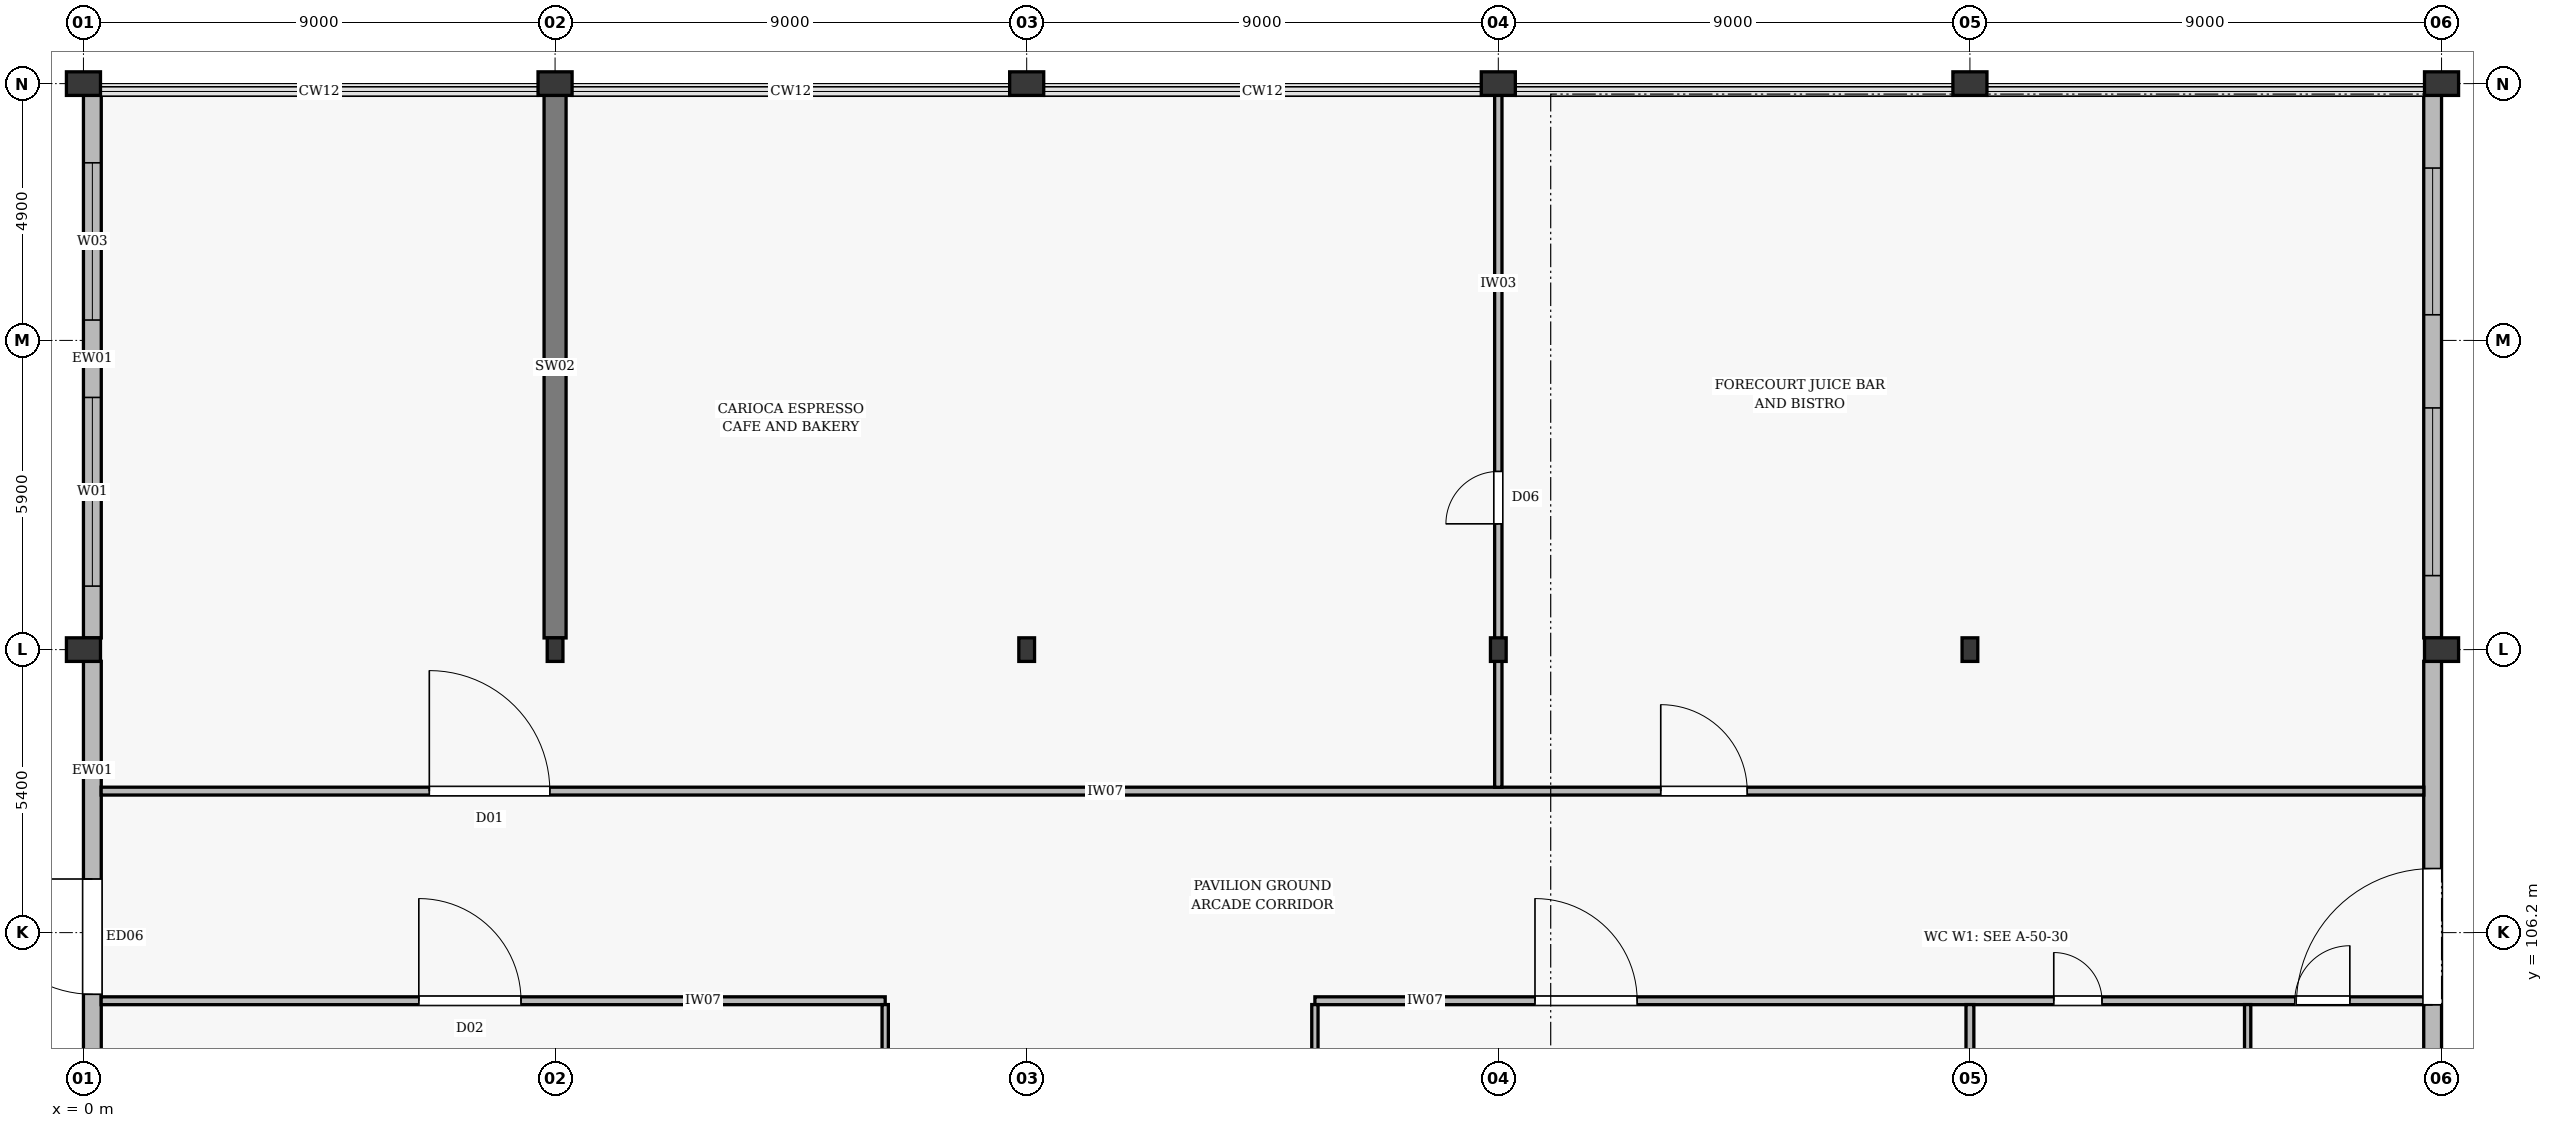
"""IFC4 building model, lengths in metres.
Left out: names, types, materials, properties, quantities, classifications, styles, units other than length and angle.
Written with IfcOpenShell. Run it as: python <this file> out.ifc"""

import sys

from ifc_helpers import new_model, si_unit, direction, frame, frame_2d, origin, origin_2d, place, context, subcontext, project, spatial, rectangle, i_section, extrude, element, fill, save


model = new_model("IFC4")
c1 = context("Model", 3, precision=1e-05, world=origin(), true_north=direction((0.0, 1.0)))
c2 = subcontext(c1, "Body", "Model", "MODEL_VIEW")
j1 = project(units=[si_unit("LENGTHUNIT", "METRE"), si_unit("PLANEANGLEUNIT", "RADIAN")], contexts=[c1])
p1 = place(None, origin())
s1 = spatial("IfcSite", under=j1, at=p1, CompositionType="ELEMENT")
p2 = place(p1, origin())
s2 = spatial("IfcBuilding", under=s1, at=p2, CompositionType="ELEMENT")
p3 = place(p2, origin())
s3 = spatial("IfcBuildingStorey", under=s2, at=p3, CompositionType="ELEMENT", Elevation=0.0)
for number, where, z_axis, x_axis in (
    (1, (0.0, 111.6, 0.0), (0.0, 0.0, 1.0), (1.0, 0.0, 0.0)),
    (2, (0.0, 122.4, 0.0), (0.0, 0.0, 1.0), (1.0, 0.0, 0.0)),
):
    element("IfcColumn", number, at=place(p3, frame(where, z_axis=z_axis, x_axis=x_axis)), inside=s3, PredefinedType="PILASTER", context=c2, shape_type="SweptSolid", body=[
        extrude(rectangle(XDim=0.65, YDim=0.45, at=origin_2d()), origin(), (0.0, 0.0, 1.0), 6.6),
    ])
p4 = place(p3, frame((9.0, 111.6, 0.0), z_axis=(0.0, 0.0, 1.0), x_axis=(1.0, 0.0, 0.0)))
e3 = element("IfcColumn", 3, at=p4, inside=s3, PredefinedType="COLUMN", context=c2, shape_type="SweptSolid", body=[
    extrude(i_section(OverallWidth=0.3, OverallDepth=0.45, WebThickness=0.014, FlangeThickness=0.026, at=origin_2d()), origin(), (0.0, 0.0, 1.0), 6.6),
])
p5 = place(p3, frame((9.0, 122.4, 0.0), z_axis=(0.0, 0.0, 1.0), x_axis=(1.0, 0.0, 0.0)))
e4 = element("IfcColumn", 4, at=p5, inside=s3, PredefinedType="PILASTER", context=c2, shape_type="SweptSolid", body=[
    extrude(rectangle(XDim=0.65, YDim=0.45, at=origin_2d()), origin(), (0.0, 0.0, 1.0), 6.6),
])
p6 = place(p3, frame((18.0, 111.6, 0.0), z_axis=(0.0, 0.0, 1.0), x_axis=(1.0, 0.0, 0.0)))
e5 = element("IfcColumn", 5, at=p6, inside=s3, PredefinedType="COLUMN", context=c2, shape_type="SweptSolid", body=[
    extrude(i_section(OverallWidth=0.3, OverallDepth=0.45, WebThickness=0.014, FlangeThickness=0.026, at=origin_2d()), origin(), (0.0, 0.0, 1.0), 6.6),
])
p7 = place(p3, frame((18.0, 122.4, 0.0), z_axis=(0.0, 0.0, 1.0), x_axis=(1.0, 0.0, 0.0)))
e6 = element("IfcColumn", 6, at=p7, inside=s3, PredefinedType="PILASTER", context=c2, shape_type="SweptSolid", body=[
    extrude(rectangle(XDim=0.65, YDim=0.45, at=origin_2d()), origin(), (0.0, 0.0, 1.0), 6.6),
])
p8 = place(p3, frame((27.0, 111.6, 0.0), z_axis=(0.0, 0.0, 1.0), x_axis=(1.0, 0.0, 0.0)))
e7 = element("IfcColumn", 7, at=p8, inside=s3, PredefinedType="COLUMN", context=c2, shape_type="SweptSolid", body=[
    extrude(i_section(OverallWidth=0.3, OverallDepth=0.45, WebThickness=0.014, FlangeThickness=0.026, at=origin_2d()), origin(), (0.0, 0.0, 1.0), 6.6),
])
p9 = place(p3, frame((27.0, 122.4, 0.0), z_axis=(0.0, 0.0, 1.0), x_axis=(1.0, 0.0, 0.0)))
e8 = element("IfcColumn", 8, at=p9, inside=s3, PredefinedType="PILASTER", context=c2, shape_type="SweptSolid", body=[
    extrude(rectangle(XDim=0.65, YDim=0.45, at=origin_2d()), origin(), (0.0, 0.0, 1.0), 6.6),
])
p10 = place(p3, frame((36.0, 111.6, 0.0), z_axis=(0.0, 0.0, 1.0), x_axis=(1.0, 0.0, 0.0)))
e9 = element("IfcColumn", 9, at=p10, inside=s3, PredefinedType="COLUMN", context=c2, shape_type="SweptSolid", body=[
    extrude(i_section(OverallWidth=0.3, OverallDepth=0.45, WebThickness=0.014, FlangeThickness=0.026, at=origin_2d()), origin(), (0.0, 0.0, 1.0), 6.6),
])
for number, where, z_axis, x_axis in (
    (10, (36.0, 122.4, 0.0), (0.0, 0.0, 1.0), (1.0, 0.0, 0.0)),
    (11, (45.0, 111.6, 0.0), (0.0, 0.0, 1.0), (1.0, 0.0, 0.0)),
    (12, (45.0, 122.4, 0.0), (0.0, 0.0, 1.0), (1.0, 0.0, 0.0)),
):
    element("IfcColumn", number, at=place(p3, frame(where, z_axis=z_axis, x_axis=x_axis)), inside=s3, PredefinedType="PILASTER", context=c2, shape_type="SweptSolid", body=[
        extrude(rectangle(XDim=0.65, YDim=0.45, at=origin_2d()), origin(), (0.0, 0.0, 1.0), 6.6),
    ])
p11 = place(p3, frame((9.0, 111.823, 0.0), z_axis=(0.0, 0.0, 1.0), x_axis=(0.0, 1.0, 0.0)))
e13 = element("IfcWall", 13, at=p11, inside=s3, PredefinedType="SHEAR", context=c2, shape_type="SweptSolid", body=[
    extrude(rectangle(XDim=10.354, YDim=0.42, at=frame_2d((5.177, 0.0))), origin(), (0.0, 0.0, 1.0), 6.35),
])
p12 = place(p3, frame((0.17, 101.023, 0.0), z_axis=(0.0, 0.0, 1.0), x_axis=(0.0, 1.0, 0.0)))
e14 = element("IfcWall", 14, at=p12, inside=s3, PredefinedType="STANDARD", context=c2, shape_type="SweptSolid", body=[
    extrude(rectangle(XDim=10.354, YDim=0.34, at=frame_2d((5.177, 0.0))), origin(), (0.0, 0.0, 1.0), 5.85),
])
p13 = place(p12, frame((4.0, 0.0, 0.005)))
e15 = element("IfcOpeningElement", 15, at=p13, cuts=e14, PredefinedType="OPENING", context=c2, shape_type="SweptSolid", body=[
    extrude(rectangle(XDim=2.2, YDim=2.45, at=frame_2d((1.1, 1.225))), frame((0.0, 0.182, 0.0), z_axis=(0.0, -1.0, 0.0), x_axis=(1.0, 0.0, 0.0)), (0.0, 0.0, 1.0), 0.364),
])
p14 = place(p3, frame((44.83, 101.023, 0.0), z_axis=(0.0, 0.0, 1.0), x_axis=(0.0, 1.0, 0.0)))
e16 = element("IfcWall", 16, at=p14, inside=s3, PredefinedType="STANDARD", context=c2, shape_type="SweptSolid", body=[
    extrude(rectangle(XDim=10.354, YDim=0.34, at=frame_2d((5.177, 0.0))), origin(), (0.0, 0.0, 1.0), 5.85),
])
p15 = place(p14, frame((3.8, 0.0, 0.005)))
e17 = element("IfcOpeningElement", 17, at=p15, cuts=e16, PredefinedType="OPENING", context=c2, shape_type="SweptSolid", body=[
    extrude(rectangle(XDim=2.6, YDim=2.6, at=frame_2d((1.3, 1.3))), frame((0.0, 0.182, 0.0), z_axis=(0.0, -1.0, 0.0), x_axis=(1.0, 0.0, 0.0)), (0.0, 0.0, 1.0), 0.364),
])
p16 = place(p3, frame((0.17, 111.823, 0.0), z_axis=(0.0, 0.0, 1.0), x_axis=(0.0, 1.0, 0.0)))
e18 = element("IfcWall", 18, at=p16, inside=s3, PredefinedType="STANDARD", context=c2, shape_type="SweptSolid", body=[
    extrude(rectangle(XDim=10.354, YDim=0.34, at=frame_2d((5.177, 0.0))), origin(), (0.0, 0.0, 1.0), 5.85),
])
p17 = place(p16, frame((0.989, 0.0, 0.75)))
e19 = element("IfcOpeningElement", 19, at=p17, cuts=e18, PredefinedType="OPENING", context=c2, shape_type="SweptSolid", body=[
    extrude(rectangle(XDim=3.6, YDim=2.8, at=frame_2d((1.8, 1.4))), frame((0.0, 0.182, 0.0), z_axis=(0.0, -1.0, 0.0), x_axis=(1.0, 0.0, 0.0)), (0.0, 0.0, 1.0), 0.364),
])
p18 = place(p16, frame((6.066, 0.0, 0.75)))
e20 = element("IfcOpeningElement", 20, at=p18, cuts=e18, PredefinedType="OPENING", context=c2, shape_type="SweptSolid", body=[
    extrude(rectangle(XDim=3.0, YDim=2.6, at=frame_2d((1.5, 1.3))), frame((0.0, 0.182, 0.0), z_axis=(0.0, -1.0, 0.0), x_axis=(1.0, 0.0, 0.0)), (0.0, 0.0, 1.0), 0.364),
])
p19 = place(p3, frame((44.83, 111.823, 0.0), z_axis=(0.0, 0.0, 1.0), x_axis=(0.0, 1.0, 0.0)))
e21 = element("IfcWall", 21, at=p19, inside=s3, PredefinedType="STANDARD", context=c2, shape_type="SweptSolid", body=[
    extrude(rectangle(XDim=10.354, YDim=0.34, at=frame_2d((5.177, 0.0))), origin(), (0.0, 0.0, 1.0), 5.85),
])
p20 = place(p19, frame((1.189, 0.0, 0.75)))
e22 = element("IfcOpeningElement", 22, at=p20, cuts=e21, PredefinedType="OPENING", context=c2, shape_type="SweptSolid", body=[
    extrude(rectangle(XDim=3.2, YDim=2.8, at=frame_2d((1.6, 1.4))), frame((0.0, 0.182, 0.0), z_axis=(0.0, -1.0, 0.0), x_axis=(1.0, 0.0, 0.0)), (0.0, 0.0, 1.0), 0.364),
])
p21 = place(p19, frame((6.166, 0.0, 0.75)))
e23 = element("IfcOpeningElement", 23, at=p21, cuts=e21, PredefinedType="OPENING", context=c2, shape_type="SweptSolid", body=[
    extrude(rectangle(XDim=2.8, YDim=2.6, at=frame_2d((1.4, 1.3))), frame((0.0, 0.182, 0.0), z_axis=(0.0, -1.0, 0.0), x_axis=(1.0, 0.0, 0.0)), (0.0, 0.0, 1.0), 0.364),
])
p22 = place(p3, frame((0.338, 104.9, 0.0), z_axis=(0.0, 0.0, 1.0), x_axis=(1.0, 0.0, 0.0)))
e24 = element("IfcWall", 24, at=p22, inside=s3, PredefinedType="PARTITIONING", context=c2, shape_type="SweptSolid", body=[
    extrude(rectangle(XDim=14.962, YDim=0.15, at=frame_2d((7.481, 0.0))), origin(), (0.0, 0.0, 1.0), 5.89),
])
p23 = place(p22, frame((6.062, 0.0, 0.005)))
e25 = element("IfcOpeningElement", 25, at=p23, cuts=e24, PredefinedType="OPENING", context=c2, shape_type="SweptSolid", body=[
    extrude(rectangle(XDim=1.95, YDim=2.3, at=frame_2d((0.975, 1.15))), frame((0.0, 0.087, 0.0), z_axis=(0.0, -1.0, 0.0), x_axis=(1.0, 0.0, 0.0)), (0.0, 0.0, 1.0), 0.174),
])
p24 = place(p3, frame((23.5, 104.9, 0.0), z_axis=(0.0, 0.0, 1.0), x_axis=(1.0, 0.0, 0.0)))
e26 = element("IfcWall", 26, at=p24, inside=s3, PredefinedType="PARTITIONING", context=c2, shape_type="SweptSolid", body=[
    extrude(rectangle(XDim=21.162, YDim=0.15, at=frame_2d((10.581, 0.0))), origin(), (0.0, 0.0, 1.0), 5.89),
])
p25 = place(p24, frame((4.2, 0.0, 0.005)))
e27 = element("IfcOpeningElement", 27, at=p25, cuts=e26, PredefinedType="OPENING", context=c2, shape_type="SweptSolid", body=[
    extrude(rectangle(XDim=1.95, YDim=2.3, at=frame_2d((0.975, 1.15))), frame((0.0, 0.087, 0.0), z_axis=(0.0, -1.0, 0.0), x_axis=(1.0, 0.0, 0.0)), (0.0, 0.0, 1.0), 0.174),
])
p26 = place(p24, frame((14.1, 0.0, 0.005)))
e28 = element("IfcOpeningElement", 28, at=p26, cuts=e26, PredefinedType="OPENING", context=c2, shape_type="SweptSolid", body=[
    extrude(rectangle(XDim=0.92, YDim=2.12, at=frame_2d((0.46, 1.06))), frame((0.0, 0.087, 0.0), z_axis=(0.0, -1.0, 0.0), x_axis=(1.0, 0.0, 0.0)), (0.0, 0.0, 1.0), 0.174),
])
p27 = place(p24, frame((18.7, 0.0, 0.005)))
e29 = element("IfcOpeningElement", 29, at=p27, cuts=e26, PredefinedType="OPENING", context=c2, shape_type="SweptSolid", body=[
    extrude(rectangle(XDim=1.05, YDim=2.15, at=frame_2d((0.525, 1.075))), frame((0.0, 0.087, 0.0), z_axis=(0.0, -1.0, 0.0), x_axis=(1.0, 0.0, 0.0)), (0.0, 0.0, 1.0), 0.174),
])
p28 = place(p3, frame((0.338, 108.9, 0.0), z_axis=(0.0, 0.0, 1.0), x_axis=(1.0, 0.0, 0.0)))
e30 = element("IfcWall", 30, at=p28, inside=s3, PredefinedType="PARTITIONING", context=c2, shape_type="SweptSolid", body=[
    extrude(rectangle(XDim=44.324, YDim=0.15, at=frame_2d((22.162, 0.0))), origin(), (0.0, 0.0, 1.0), 5.89),
])
p29 = place(p28, frame((6.262, 0.0, 0.005)))
e31 = element("IfcOpeningElement", 31, at=p29, cuts=e30, PredefinedType="OPENING", context=c2, shape_type="SweptSolid", body=[
    extrude(rectangle(XDim=2.3, YDim=2.4, at=frame_2d((1.15, 1.2))), frame((0.0, 0.087, 0.0), z_axis=(0.0, -1.0, 0.0), x_axis=(1.0, 0.0, 0.0)), (0.0, 0.0, 1.0), 0.174),
])
p30 = place(p28, frame((29.762, 0.0, 0.005)))
e32 = element("IfcOpeningElement", 32, at=p30, cuts=e30, PredefinedType="OPENING", context=c2, shape_type="SweptSolid", body=[
    extrude(rectangle(XDim=1.65, YDim=2.2, at=frame_2d((0.825, 1.1))), frame((0.0, 0.087, 0.0), z_axis=(0.0, -1.0, 0.0), x_axis=(1.0, 0.0, 0.0)), (0.0, 0.0, 1.0), 0.174),
])
for number, where, z_axis, x_axis in (
    (33, (15.3, 90.238, 0.0), (0.0, 0.0, 1.0), (0.0, 1.0, 0.0)),
    (34, (23.5, 90.238, 0.0), (0.0, 0.0, 1.0), (0.0, 1.0, 0.0)),
):
    element("IfcWall", number, at=place(p3, frame(where, z_axis=z_axis, x_axis=x_axis)), inside=s3, PredefinedType="PARTITIONING", context=c2, shape_type="SweptSolid", body=[
        extrude(rectangle(XDim=14.589, YDim=0.12, at=frame_2d((7.294, 0.0))), origin(), (0.0, 0.0, 1.0), 5.84),
    ])
p31 = place(p3, frame((27.0, 108.973, 0.0), z_axis=(0.0, 0.0, 1.0), x_axis=(0.0, 1.0, 0.0)))
e35 = element("IfcWall", 35, at=p31, inside=s3, PredefinedType="PARTITIONING", context=c2, shape_type="SweptSolid", body=[
    extrude(rectangle(XDim=13.204, YDim=0.14, at=frame_2d((6.602, 0.0))), origin(), (0.0, 0.0, 1.0), 5.84),
])
p32 = place(p31, frame((5.027, 0.0, 0.005)))
e36 = element("IfcOpeningElement", 36, at=p32, cuts=e35, PredefinedType="OPENING", context=c2, shape_type="SweptSolid", body=[
    extrude(rectangle(XDim=1.0, YDim=2.1, at=frame_2d((0.5, 1.05))), frame((0.0, 0.082, 0.0), z_axis=(0.0, -1.0, 0.0), x_axis=(1.0, 0.0, 0.0)), (0.0, 0.0, 1.0), 0.164),
])
p33 = place(p3, frame((36.0, 90.223, 0.0), z_axis=(0.0, 0.0, 1.0), x_axis=(0.0, 1.0, 0.0)))
e37 = element("IfcWall", 37, at=p33, inside=s3, PredefinedType="PARTITIONING", context=c2, shape_type="SweptSolid", body=[
    extrude(rectangle(XDim=14.604, YDim=0.15, at=frame_2d((7.302, 0.0))), origin(), (0.0, 0.0, 1.0), 5.84),
])
p34 = place(p3, frame((41.3, 90.338, 0.0), z_axis=(0.0, 0.0, 1.0), x_axis=(0.0, 1.0, 0.0)))
e38 = element("IfcWall", 38, at=p34, inside=s3, PredefinedType="PARTITIONING", context=c2, shape_type="SweptSolid", body=[
    extrude(rectangle(XDim=14.489, YDim=0.12, at=frame_2d((7.245, 0.0))), origin(), (0.0, 0.0, 1.0), 5.84),
])
p35 = place(p13, origin())
e39 = element("IfcDoor", 39, at=p35, inside=s3, OperationType="SINGLE_SWING_RIGHT", PredefinedType="DOOR", context=c2, shape_type="SweptSolid", body=[
    extrude(rectangle(XDim=2.2, YDim=2.45, at=frame_2d((1.1, 1.225))), frame((0.0, 0.025, 0.0), z_axis=(0.0, -1.0, 0.0), x_axis=(1.0, 0.0, 0.0)), (0.0, 0.0, 1.0), 0.05),
])
fill(e15, e39)
p36 = place(p15, origin())
e40 = element("IfcDoor", 40, at=p36, inside=s3, OperationType="DOUBLE_DOOR_SINGLE_SWING", PredefinedType="DOOR", context=c2, shape_type="SweptSolid", body=[
    extrude(rectangle(XDim=2.6, YDim=2.6, at=frame_2d((1.3, 1.3))), frame((0.0, 0.025, 0.0), z_axis=(0.0, -1.0, 0.0), x_axis=(1.0, 0.0, 0.0)), (0.0, 0.0, 1.0), 0.05),
])
fill(e17, e40)
p37 = place(p17, origin())
e41 = element("IfcWindow", 41, at=p37, inside=s3, PartitioningType="DOUBLE_PANEL_VERTICAL", PredefinedType="WINDOW", context=c2, shape_type="SweptSolid", body=[
    extrude(rectangle(XDim=3.6, YDim=2.8, at=frame_2d((1.8, 1.4))), frame((0.0, 0.03, 0.0), z_axis=(0.0, -1.0, 0.0), x_axis=(1.0, 0.0, 0.0)), (0.0, 0.0, 1.0), 0.06),
])
fill(e19, e41)
p38 = place(p18, origin())
e42 = element("IfcWindow", 42, at=p38, inside=s3, PartitioningType="DOUBLE_PANEL_VERTICAL", PredefinedType="WINDOW", context=c2, shape_type="SweptSolid", body=[
    extrude(rectangle(XDim=3.0, YDim=2.6, at=frame_2d((1.5, 1.3))), frame((0.0, 0.03, 0.0), z_axis=(0.0, -1.0, 0.0), x_axis=(1.0, 0.0, 0.0)), (0.0, 0.0, 1.0), 0.06),
])
fill(e20, e42)
p39 = place(p20, origin())
e43 = element("IfcWindow", 43, at=p39, inside=s3, PartitioningType="DOUBLE_PANEL_VERTICAL", PredefinedType="WINDOW", context=c2, shape_type="SweptSolid", body=[
    extrude(rectangle(XDim=3.2, YDim=2.8, at=frame_2d((1.6, 1.4))), frame((0.0, 0.03, 0.0), z_axis=(0.0, -1.0, 0.0), x_axis=(1.0, 0.0, 0.0)), (0.0, 0.0, 1.0), 0.06),
])
fill(e22, e43)
p40 = place(p21, origin())
e44 = element("IfcWindow", 44, at=p40, inside=s3, PartitioningType="DOUBLE_PANEL_VERTICAL", PredefinedType="WINDOW", context=c2, shape_type="SweptSolid", body=[
    extrude(rectangle(XDim=2.8, YDim=2.6, at=frame_2d((1.4, 1.3))), frame((0.0, 0.03, 0.0), z_axis=(0.0, -1.0, 0.0), x_axis=(1.0, 0.0, 0.0)), (0.0, 0.0, 1.0), 0.06),
])
fill(e23, e44)
p41 = place(p23, origin())
e45 = element("IfcDoor", 45, at=p41, inside=s3, OperationType="DOUBLE_DOOR_SINGLE_SWING", PredefinedType="DOOR", context=c2, shape_type="SweptSolid", body=[
    extrude(rectangle(XDim=1.95, YDim=2.3, at=frame_2d((0.975, 1.15))), frame((0.0, 0.025, 0.0), z_axis=(0.0, -1.0, 0.0), x_axis=(1.0, 0.0, 0.0)), (0.0, 0.0, 1.0), 0.05),
])
fill(e25, e45)
p42 = place(p25, origin())
e46 = element("IfcDoor", 46, at=p42, inside=s3, OperationType="DOUBLE_DOOR_SINGLE_SWING", PredefinedType="DOOR", context=c2, shape_type="SweptSolid", body=[
    extrude(rectangle(XDim=1.95, YDim=2.3, at=frame_2d((0.975, 1.15))), frame((0.0, 0.025, 0.0), z_axis=(0.0, -1.0, 0.0), x_axis=(1.0, 0.0, 0.0)), (0.0, 0.0, 1.0), 0.05),
])
fill(e27, e46)
p43 = place(p26, origin())
e47 = element("IfcDoor", 47, at=p43, inside=s3, OperationType="SINGLE_SWING_LEFT", PredefinedType="DOOR", context=c2, shape_type="SweptSolid", body=[
    extrude(rectangle(XDim=0.92, YDim=2.12, at=frame_2d((0.46, 1.06))), frame((0.0, 0.025, 0.0), z_axis=(0.0, -1.0, 0.0), x_axis=(1.0, 0.0, 0.0)), (0.0, 0.0, 1.0), 0.05),
])
fill(e28, e47)
p44 = place(p27, origin())
e48 = element("IfcDoor", 48, at=p44, inside=s3, OperationType="SINGLE_SWING_RIGHT", PredefinedType="DOOR", context=c2, shape_type="SweptSolid", body=[
    extrude(rectangle(XDim=1.05, YDim=2.15, at=frame_2d((0.525, 1.075))), frame((0.0, 0.025, 0.0), z_axis=(0.0, -1.0, 0.0), x_axis=(1.0, 0.0, 0.0)), (0.0, 0.0, 1.0), 0.05),
])
fill(e29, e48)
p45 = place(p29, origin())
e49 = element("IfcDoor", 49, at=p45, inside=s3, OperationType="DOUBLE_DOOR_SINGLE_SWING", PredefinedType="DOOR", context=c2, shape_type="SweptSolid", body=[
    extrude(rectangle(XDim=2.3, YDim=2.4, at=frame_2d((1.15, 1.2))), frame((0.0, 0.025, 0.0), z_axis=(0.0, -1.0, 0.0), x_axis=(1.0, 0.0, 0.0)), (0.0, 0.0, 1.0), 0.05),
])
fill(e31, e49)
p46 = place(p30, origin())
e50 = element("IfcDoor", 50, at=p46, inside=s3, OperationType="DOUBLE_DOOR_SINGLE_SWING", PredefinedType="DOOR", context=c2, shape_type="SweptSolid", body=[
    extrude(rectangle(XDim=1.65, YDim=2.2, at=frame_2d((0.825, 1.1))), frame((0.0, 0.025, 0.0), z_axis=(0.0, -1.0, 0.0), x_axis=(1.0, 0.0, 0.0)), (0.0, 0.0, 1.0), 0.05),
])
fill(e32, e50)
p47 = place(p32, origin())
e51 = element("IfcDoor", 51, at=p47, inside=s3, OperationType="SINGLE_SWING_LEFT", PredefinedType="DOOR", context=c2, shape_type="SweptSolid", body=[
    extrude(rectangle(XDim=1.0, YDim=2.1, at=frame_2d((0.5, 1.05))), frame((0.0, 0.025, 0.0), z_axis=(0.0, -1.0, 0.0), x_axis=(1.0, 0.0, 0.0)), (0.0, 0.0, 1.0), 0.05),
])
fill(e36, e51)
save(model, sys.argv[1])
